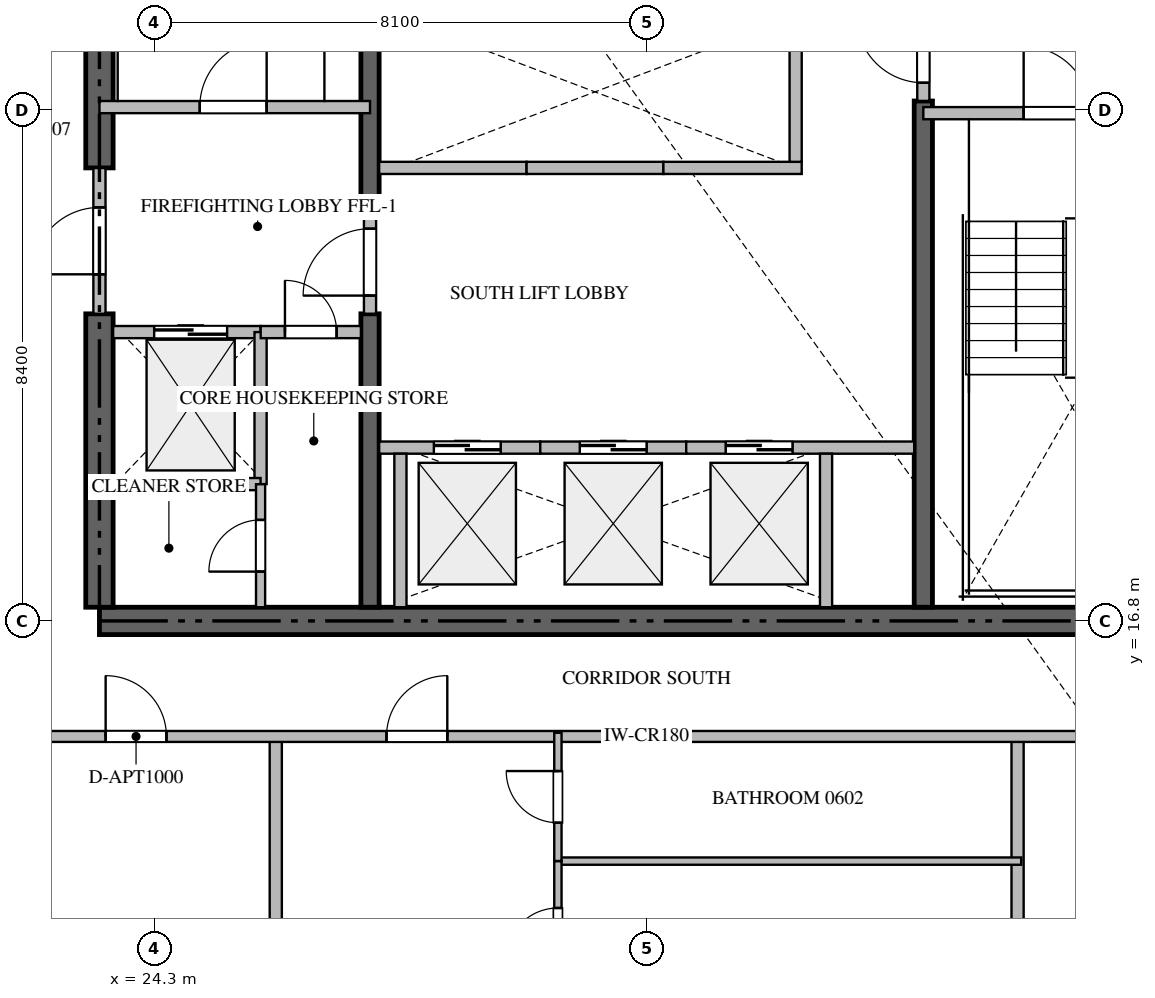
"""IFC4 building model, lengths in metres.
Left out: names, types, materials, properties, quantities, classifications, styles, units other than length and angle.
Written with IfcOpenShell. Run it as: python <this file> out.ifc"""

import sys

from ifc_helpers import new_model, si_unit, direction, frame, frame_2d, origin, place, context, subcontext, project, spatial, rectangle, extrude, source, transform, mapped, element, fill, save


model = new_model("IFC4")
c1 = context("Model", 3, precision=1e-05, world=origin(), true_north=direction((0.0, 1.0)))
c2 = subcontext(c1, "Body", "Model", "MODEL_VIEW")
j1 = project(units=[si_unit("LENGTHUNIT", "METRE"), si_unit("PLANEANGLEUNIT", "RADIAN")], contexts=[c1])
p1 = place(None, origin())
s1 = spatial("IfcSite", under=j1, at=p1, CompositionType="ELEMENT")
p2 = place(p1, origin())
s2 = spatial("IfcBuilding", under=s1, at=p2, CompositionType="ELEMENT")
p3 = place(p2, frame((0.0, 0.0, 30.45)))
s3 = spatial("IfcBuildingStorey", under=s2, at=p3, CompositionType="ELEMENT", Elevation=30.45)
p4 = place(p3, frame((23.4, 16.8, -0.26), z_axis=(0.0, 0.0, 1.0), x_axis=(1.0, 0.0, 0.0)))
e1 = element("IfcWall", 1, at=p4, inside=s3, PredefinedType="SHEAR", context=c2, shape_type="SweptSolid", body=[
    extrude(rectangle(XDim=18.0, YDim=0.45, at=frame_2d((9.0, 0.0))), origin(), (0.0, 0.0, 1.0), 3.748),
])
p5 = place(p3, frame((23.4, 17.025, -0.26), z_axis=(0.0, 0.0, 1.0), x_axis=(0.0, 1.0, 0.0)))
e2 = element("IfcWall", 2, at=p5, inside=s3, PredefinedType="SHEAR", context=c2, shape_type="SweptSolid", body=[
    extrude(rectangle(XDim=4.825, YDim=0.45, at=frame_2d((2.413, 0.0))), origin(), (0.0, 0.0, 1.0), 3.748),
])
p6 = place(p3, frame((23.4, 24.25, -0.26), z_axis=(0.0, 0.0, 1.0), x_axis=(0.0, 1.0, 0.0)))
e3 = element("IfcWall", 3, at=p6, inside=s3, PredefinedType="SHEAR", context=c2, shape_type="SweptSolid", body=[
    extrude(rectangle(XDim=9.125, YDim=0.45, at=frame_2d((4.562, 0.0))), origin(), (0.0, 0.0, 1.0), 3.748),
])
p7 = place(p3, frame((27.85, 17.025, -0.26), z_axis=(0.0, 0.0, 1.0), x_axis=(0.0, 1.0, 0.0)))
e4 = element("IfcWall", 4, at=p7, inside=s3, PredefinedType="SHEAR", context=c2, shape_type="SweptSolid", body=[
    extrude(rectangle(XDim=4.825, YDim=0.3, at=frame_2d((2.413, 0.0))), origin(), (0.0, 0.0, 1.0), 3.748),
])
p8 = place(p3, frame((27.85, 23.55, -0.26), z_axis=(0.0, 0.0, 1.0), x_axis=(0.0, 1.0, 0.0)))
e5 = element("IfcWall", 5, at=p8, inside=s3, PredefinedType="SHEAR", context=c2, shape_type="SweptSolid", body=[
    extrude(rectangle(XDim=9.825, YDim=0.3, at=frame_2d((4.913, 0.0))), origin(), (0.0, 0.0, 1.0), 3.748),
])
p9 = place(p3, frame((36.95, 17.025, -0.26), z_axis=(0.0, 0.0, 1.0), x_axis=(0.0, 1.0, 0.0)))
e6 = element("IfcWall", 6, at=p9, inside=s3, PredefinedType="SHEAR", context=c2, shape_type="SweptSolid", body=[
    extrude(rectangle(XDim=8.325, YDim=0.3, at=frame_2d((4.163, 0.0))), origin(), (0.0, 0.0, 1.0), 3.748),
])
p10 = place(p3, frame((23.4, 25.25, 0.0), z_axis=(0.0, 0.0, 1.0), x_axis=(1.0, 0.0, 0.0)))
e7 = element("IfcWall", 7, at=p10, inside=s3, PredefinedType="STANDARD", context=c2, shape_type="SweptSolid", body=[
    extrude(rectangle(XDim=4.45, YDim=0.2, at=frame_2d((2.225, 0.0))), origin(), (0.0, 0.0, 1.0), 3.49),
])
p11 = place(p10, frame((1.65, 0.0, 0.0)))
e8 = element("IfcOpeningElement", 8, at=p11, cuts=e7, PredefinedType="OPENING", context=c2, shape_type="SweptSolid", body=[
    extrude(rectangle(XDim=1.1, YDim=2.15, at=frame_2d((0.55, 1.075))), frame((0.0, 0.11, 0.0), z_axis=(0.0, -1.0, 0.0), x_axis=(1.0, 0.0, 0.0)), (0.0, 0.0, 1.0), 0.22),
])
p12 = place(p3, frame((36.95, 25.15, 0.0), z_axis=(0.0, 0.0, 1.0), x_axis=(1.0, 0.0, 0.0)))
e9 = element("IfcWall", 9, at=p12, inside=s3, PredefinedType="STANDARD", context=c2, shape_type="SweptSolid", body=[
    extrude(rectangle(XDim=4.45, YDim=0.2, at=frame_2d((2.225, 0.0))), origin(), (0.0, 0.0, 1.0), 3.49),
])
p13 = place(p12, frame((1.65, 0.0, 0.0)))
e10 = element("IfcOpeningElement", 10, at=p13, cuts=e9, PredefinedType="OPENING", context=c2, shape_type="SweptSolid", body=[
    extrude(rectangle(XDim=1.1, YDim=2.15, at=frame_2d((0.55, 1.075))), frame((0.0, 0.11, 0.0), z_axis=(0.0, -1.0, 0.0), x_axis=(1.0, 0.0, 0.0)), (0.0, 0.0, 1.0), 0.22),
])
p14 = place(p3, frame((23.625, 21.55, 0.0), z_axis=(0.0, 0.0, 1.0), x_axis=(1.0, 0.0, 0.0)))
e11 = element("IfcWall", 11, at=p14, inside=s3, PredefinedType="STANDARD", context=c2, shape_type="SweptSolid", body=[
    extrude(rectangle(XDim=2.425, YDim=0.2, at=frame_2d((1.212, 0.0))), origin(), (0.0, 0.0, 1.0), 3.49),
])
p15 = place(p14, frame((0.675, 0.0, 0.0)))
e12 = element("IfcOpeningElement", 12, at=p15, cuts=e11, PredefinedType="OPENING", context=c2, shape_type="SweptSolid", body=[
    extrude(rectangle(XDim=1.2, YDim=2.2, at=frame_2d((0.6, 1.1))), frame((0.0, 0.11, 0.0), z_axis=(0.0, -1.0, 0.0), x_axis=(1.0, 0.0, 0.0)), (0.0, 0.0, 1.0), 0.22),
])
p16 = place(p3, frame((28.0, 19.65, 0.0), z_axis=(0.0, 0.0, 1.0), x_axis=(1.0, 0.0, 0.0)))
e13 = element("IfcWall", 13, at=p16, inside=s3, PredefinedType="STANDARD", context=c2, shape_type="SweptSolid", body=[
    extrude(rectangle(XDim=2.65, YDim=0.2, at=frame_2d((1.325, 0.0))), origin(), (0.0, 0.0, 1.0), 3.49),
])
p17 = place(p16, frame((0.9, 0.0, 0.0)))
e14 = element("IfcOpeningElement", 14, at=p17, cuts=e13, PredefinedType="OPENING", context=c2, shape_type="SweptSolid", body=[
    extrude(rectangle(XDim=1.1, YDim=2.2, at=frame_2d((0.55, 1.1))), frame((0.0, 0.11, 0.0), z_axis=(0.0, -1.0, 0.0), x_axis=(1.0, 0.0, 0.0)), (0.0, 0.0, 1.0), 0.22),
])
p18 = place(p3, frame((28.35, 17.025, 0.0), z_axis=(0.0, 0.0, 1.0), x_axis=(0.0, 1.0, 0.0)))
e15 = element("IfcWall", 15, at=p18, inside=s3, PredefinedType="STANDARD", context=c2, shape_type="SweptSolid", body=[
    extrude(rectangle(XDim=2.525, YDim=0.2, at=frame_2d((1.263, 0.0))), origin(), (0.0, 0.0, 1.0), 3.49),
])
p19 = place(p3, frame((30.65, 19.65, 0.0), z_axis=(0.0, 0.0, 1.0), x_axis=(1.0, 0.0, 0.0)))
e16 = element("IfcWall", 16, at=p19, inside=s3, PredefinedType="STANDARD", context=c2, shape_type="SweptSolid", body=[
    extrude(rectangle(XDim=2.4, YDim=0.2, at=frame_2d((1.2, 0.0))), origin(), (0.0, 0.0, 1.0), 3.49),
])
p20 = place(p19, frame((0.65, 0.0, 0.0)))
e17 = element("IfcOpeningElement", 17, at=p20, cuts=e16, PredefinedType="OPENING", context=c2, shape_type="SweptSolid", body=[
    extrude(rectangle(XDim=1.1, YDim=2.2, at=frame_2d((0.55, 1.1))), frame((0.0, 0.11, 0.0), z_axis=(0.0, -1.0, 0.0), x_axis=(1.0, 0.0, 0.0)), (0.0, 0.0, 1.0), 0.22),
])
p21 = place(p3, frame((33.05, 19.65, 0.0), z_axis=(0.0, 0.0, 1.0), x_axis=(1.0, 0.0, 0.0)))
e18 = element("IfcWall", 18, at=p21, inside=s3, PredefinedType="STANDARD", context=c2, shape_type="SweptSolid", body=[
    extrude(rectangle(XDim=3.75, YDim=0.2, at=frame_2d((1.875, 0.0))), origin(), (0.0, 0.0, 1.0), 3.49),
])
p22 = place(p21, frame((0.65, 0.0, 0.0)))
e19 = element("IfcOpeningElement", 19, at=p22, cuts=e18, PredefinedType="OPENING", context=c2, shape_type="SweptSolid", body=[
    extrude(rectangle(XDim=1.1, YDim=2.2, at=frame_2d((0.55, 1.1))), frame((0.0, 0.11, 0.0), z_axis=(0.0, -1.0, 0.0), x_axis=(1.0, 0.0, 0.0)), (0.0, 0.0, 1.0), 0.22),
])
p23 = place(p3, frame((35.35, 17.025, 0.0), z_axis=(0.0, 0.0, 1.0), x_axis=(0.0, 1.0, 0.0)))
e20 = element("IfcWall", 20, at=p23, inside=s3, PredefinedType="STANDARD", context=c2, shape_type="SweptSolid", body=[
    extrude(rectangle(XDim=2.525, YDim=0.2, at=frame_2d((1.263, 0.0))), origin(), (0.0, 0.0, 1.0), 3.49),
])
p24 = place(p3, frame((28.0, 24.25, 0.0), z_axis=(0.0, 0.0, 1.0), x_axis=(1.0, 0.0, 0.0)))
e21 = element("IfcWall", 21, at=p24, inside=s3, PredefinedType="STANDARD", context=c2, shape_type="SweptSolid", body=[
    extrude(rectangle(XDim=2.425, YDim=0.2, at=frame_2d((1.212, 0.0))), origin(), (0.0, 0.0, 1.0), 3.49),
])
p25 = place(p3, frame((30.425, 24.25, 0.0), z_axis=(0.0, 0.0, 1.0), x_axis=(1.0, 0.0, 0.0)))
e22 = element("IfcWall", 22, at=p25, inside=s3, PredefinedType="STANDARD", context=c2, shape_type="SweptSolid", body=[
    extrude(rectangle(XDim=2.25, YDim=0.2, at=frame_2d((1.125, 0.0))), origin(), (0.0, 0.0, 1.0), 3.49),
])
p26 = place(p3, frame((32.675, 24.25, 0.0), z_axis=(0.0, 0.0, 1.0), x_axis=(1.0, 0.0, 0.0)))
e23 = element("IfcWall", 23, at=p26, inside=s3, PredefinedType="STANDARD", context=c2, shape_type="SweptSolid", body=[
    extrude(rectangle(XDim=2.275, YDim=0.2, at=frame_2d((1.137, 0.0))), origin(), (0.0, 0.0, 1.0), 3.49),
])
for number, where, z_axis, x_axis in (
    (24, (34.85, 24.35, 0.0), (0.0, 0.0, 1.0), (0.0, 1.0, 0.0)),
    (25, (26.05, 19.05, 0.0), (0.0, 0.0, 1.0), (0.0, 1.0, 0.0)),
):
    element("IfcWall", number, at=place(p3, frame(where, z_axis=z_axis, x_axis=x_axis)), inside=s3, PredefinedType="STANDARD", context=c2, shape_type="SweptSolid", body=[
        extrude(rectangle(XDim=2.5, YDim=0.2, at=frame_2d((1.25, 0.0))), origin(), (0.0, 0.0, 1.0), 3.49),
    ])
p27 = place(p3, frame((23.625, 19.05, 0.0), z_axis=(0.0, 0.0, 1.0), x_axis=(1.0, 0.0, 0.0)))
e26 = element("IfcWall", 26, at=p27, inside=s3, PredefinedType="STANDARD", context=c2, shape_type="SweptSolid", body=[
    extrude(rectangle(XDim=2.425, YDim=0.2, at=frame_2d((1.212, 0.0))), origin(), (0.0, 0.0, 1.0), 3.49),
])
p28 = place(p3, frame((26.052, 21.55, 0.0), z_axis=(0.0, 0.0, 1.0), x_axis=(1.0, 0.0, 0.0)))
e27 = element("IfcWall", 27, at=p28, inside=s3, PredefinedType="STANDARD", context=c2, shape_type="SweptSolid", body=[
    extrude(rectangle(XDim=1.648, YDim=0.2, at=frame_2d((0.824, 0.0))), origin(), (0.0, 0.0, 1.0), 3.49),
])
p29 = place(p28, frame((0.399, 0.0, 0.0)))
e28 = element("IfcOpeningElement", 28, at=p29, cuts=e27, PredefinedType="OPENING", context=c2, shape_type="SweptSolid", body=[
    extrude(rectangle(XDim=0.85, YDim=2.1, at=frame_2d((0.425, 1.05))), frame((0.0, 0.11, 0.0), z_axis=(0.0, -1.0, 0.0), x_axis=(1.0, 0.0, 0.0)), (0.0, 0.0, 1.0), 0.22),
])
p30 = place(p3, frame((23.4, 21.852, 0.0), z_axis=(0.0, 0.0, 1.0), x_axis=(0.0, 1.0, 0.0)))
e29 = element("IfcWall", 29, at=p30, inside=s3, PredefinedType="STANDARD", context=c2, shape_type="SweptSolid", body=[
    extrude(rectangle(XDim=2.396, YDim=0.2, at=frame_2d((1.198, 0.0))), origin(), (0.0, 0.0, 1.0), 3.49),
])
p31 = place(p30, frame((0.648, 0.0, 0.0)))
e30 = element("IfcOpeningElement", 30, at=p31, cuts=e29, PredefinedType="OPENING", context=c2, shape_type="SweptSolid", body=[
    extrude(rectangle(XDim=1.1, YDim=2.15, at=frame_2d((0.55, 1.075))), frame((0.0, 0.11, 0.0), z_axis=(0.0, -1.0, 0.0), x_axis=(1.0, 0.0, 0.0)), (0.0, 0.0, 1.0), 0.22),
])
p32 = place(p3, frame((27.85, 21.852, 0.0), z_axis=(0.0, 0.0, 1.0), x_axis=(0.0, 1.0, 0.0)))
e31 = element("IfcWall", 31, at=p32, inside=s3, PredefinedType="STANDARD", context=c2, shape_type="SweptSolid", body=[
    extrude(rectangle(XDim=1.696, YDim=0.2, at=frame_2d((0.848, 0.0))), origin(), (0.0, 0.0, 1.0), 3.49),
])
p33 = place(p32, frame((0.298, 0.0, 0.0)))
e32 = element("IfcOpeningElement", 32, at=p33, cuts=e31, PredefinedType="OPENING", context=c2, shape_type="SweptSolid", body=[
    extrude(rectangle(XDim=1.1, YDim=2.15, at=frame_2d((0.55, 1.075))), frame((0.0, 0.11, 0.0), z_axis=(0.0, -1.0, 0.0), x_axis=(1.0, 0.0, 0.0)), (0.0, 0.0, 1.0), 0.22),
])
p34 = place(p3, frame((36.95, 25.352, 0.0), z_axis=(0.0, 0.0, 1.0), x_axis=(0.0, 1.0, 0.0)))
e33 = element("IfcWall", 33, at=p34, inside=s3, PredefinedType="STANDARD", context=c2, shape_type="SweptSolid", body=[
    extrude(rectangle(XDim=1.696, YDim=0.2, at=frame_2d((0.848, 0.0))), origin(), (0.0, 0.0, 1.0), 3.49),
])
p35 = place(p34, frame((0.298, 0.0, 0.0)))
e34 = element("IfcOpeningElement", 34, at=p35, cuts=e33, PredefinedType="OPENING", context=c2, shape_type="SweptSolid", body=[
    extrude(rectangle(XDim=1.1, YDim=2.15, at=frame_2d((0.55, 1.075))), frame((0.0, 0.11, 0.0), z_axis=(0.0, -1.0, 0.0), x_axis=(1.0, 0.0, 0.0)), (0.0, 0.0, 1.0), 0.22),
])
p36 = place(p3, frame((26.05, 17.025, 0.0), z_axis=(0.0, 0.0, 1.0), x_axis=(0.0, 1.0, 0.0)))
e35 = element("IfcWall", 35, at=p36, inside=s3, PredefinedType="PARTITIONING", context=c2, shape_type="SweptSolid", body=[
    extrude(rectangle(XDim=2.023, YDim=0.15, at=frame_2d((1.012, 0.0))), origin(), (0.0, 0.0, 1.0), 3.49),
])
p37 = place(p36, frame((0.586, 0.0, 0.0)))
e36 = element("IfcOpeningElement", 36, at=p37, cuts=e35, PredefinedType="OPENING", context=c2, shape_type="SweptSolid", body=[
    extrude(rectangle(XDim=0.85, YDim=2.1, at=frame_2d((0.425, 1.05))), frame((0.0, 0.085, 0.0), z_axis=(0.0, -1.0, 0.0), x_axis=(1.0, 0.0, 0.0)), (0.0, 0.0, 1.0), 0.17),
])
for number, where, z_axis, x_axis in (
    (37, (26.3, 0.282, 0.0), (0.0, 0.0, 1.0), (0.0, 1.0, 0.0)),
    (38, (38.5, 0.282, 0.0), (0.0, 0.0, 1.0), (0.0, 1.0, 0.0)),
):
    element("IfcWall", number, at=place(p3, frame(where, z_axis=z_axis, x_axis=x_axis)), inside=s3, PredefinedType="PARTITIONING", context=c2, shape_type="SweptSolid", body=[
        extrude(rectangle(XDim=14.618, YDim=0.2, at=frame_2d((7.309, 0.0))), origin(), (0.0, 0.0, 1.0), 3.49),
    ])
p38 = place(p3, frame((21.402, 14.9, 0.0), z_axis=(0.0, 0.0, 1.0), x_axis=(1.0, 0.0, 0.0)))
e39 = element("IfcWall", 39, at=p38, inside=s3, PredefinedType="PARTITIONING", context=c2, shape_type="SweptSolid", body=[
    extrude(rectangle(XDim=21.996, YDim=0.18, at=frame_2d((10.998, 0.0))), origin(), (0.0, 0.0, 1.0), 3.49),
])
p39 = place(p38, frame((2.1, 0.0, 0.0)))
e40 = element("IfcOpeningElement", 40, at=p39, cuts=e39, PredefinedType="OPENING", context=c2, shape_type="SweptSolid", body=[
    extrude(rectangle(XDim=1.0, YDim=2.15, at=frame_2d((0.5, 1.075))), frame((0.0, 0.1, 0.0), z_axis=(0.0, -1.0, 0.0), x_axis=(1.0, 0.0, 0.0)), (0.0, 0.0, 1.0), 0.2),
])
p40 = place(p38, frame((6.719, 0.0, 0.0)))
e41 = element("IfcOpeningElement", 41, at=p40, cuts=e39, PredefinedType="OPENING", context=c2, shape_type="SweptSolid", body=[
    extrude(rectangle(XDim=1.0, YDim=2.15, at=frame_2d((0.5, 1.075))), frame((0.0, 0.1, 0.0), z_axis=(0.0, -1.0, 0.0), x_axis=(1.0, 0.0, 0.0)), (0.0, 0.0, 1.0), 0.2),
])
p41 = place(p38, frame((18.896, 0.0, 0.0)))
e42 = element("IfcOpeningElement", 42, at=p41, cuts=e39, PredefinedType="OPENING", context=c2, shape_type="SweptSolid", body=[
    extrude(rectangle(XDim=1.0, YDim=2.15, at=frame_2d((0.5, 1.075))), frame((0.0, 0.1, 0.0), z_axis=(0.0, -1.0, 0.0), x_axis=(1.0, 0.0, 0.0)), (0.0, 0.0, 1.0), 0.2),
])
p42 = place(p3, frame((30.94, 12.85, 0.0), z_axis=(0.0, 0.0, 1.0), x_axis=(1.0, 0.0, 0.0)))
e43 = element("IfcWall", 43, at=p42, inside=s3, PredefinedType="PARTITIONING", context=c2, shape_type="SweptSolid", body=[
    extrude(rectangle(XDim=7.62, YDim=0.12, at=frame_2d((3.81, 0.0))), origin(), (0.0, 0.0, 1.0), 3.49),
])
p43 = place(p3, frame((30.94, 10.458, 0.0), z_axis=(0.0, 0.0, 1.0), x_axis=(0.0, 1.0, 0.0)))
e44 = element("IfcWall", 44, at=p43, inside=s3, PredefinedType="PARTITIONING", context=c2, shape_type="SweptSolid", body=[
    extrude(rectangle(XDim=2.392, YDim=0.12, at=frame_2d((1.196, 0.0))), origin(), (0.0, 0.0, 1.0), 3.49),
])
p44 = place(p43, frame((0.771, 0.0, 0.0)))
e45 = element("IfcOpeningElement", 45, at=p44, cuts=e44, PredefinedType="OPENING", context=c2, shape_type="SweptSolid", body=[
    extrude(rectangle(XDim=0.85, YDim=2.1, at=frame_2d((0.425, 1.05))), frame((0.0, 0.07, 0.0), z_axis=(0.0, -1.0, 0.0), x_axis=(1.0, 0.0, 0.0)), (0.0, 0.0, 1.0), 0.14),
])
p45 = place(p3, frame((30.94, 12.852, 0.0), z_axis=(0.0, 0.0, 1.0), x_axis=(0.0, 1.0, 0.0)))
e46 = element("IfcWall", 46, at=p45, inside=s3, PredefinedType="PARTITIONING", context=c2, shape_type="SweptSolid", body=[
    extrude(rectangle(XDim=2.108, YDim=0.12, at=frame_2d((1.054, 0.0))), origin(), (0.0, 0.0, 1.0), 3.49),
])
p46 = place(p45, frame((0.629, 0.0, 0.0)))
e47 = element("IfcOpeningElement", 47, at=p46, cuts=e46, PredefinedType="OPENING", context=c2, shape_type="SweptSolid", body=[
    extrude(rectangle(XDim=0.85, YDim=2.1, at=frame_2d((0.425, 1.05))), frame((0.0, 0.07, 0.0), z_axis=(0.0, -1.0, 0.0), x_axis=(1.0, 0.0, 0.0)), (0.0, 0.0, 1.0), 0.14),
])
m1 = source(origin(), c2, "Body", "SweptSolid", [
    extrude(rectangle(XDim=1.1, YDim=2.15, at=frame_2d((0.55, 1.075))), frame((0.0, 0.025, 0.0), z_axis=(0.0, -1.0, 0.0), x_axis=(1.0, 0.0, 0.0)), (0.0, 0.0, 1.0), 0.05),
])
p47 = place(p11, origin())
e48 = element("IfcDoor", 48, at=p47, inside=s3, OperationType="SINGLE_SWING_RIGHT", PredefinedType="DOOR", context=c2, shape_type="MappedRepresentation", body=[
    mapped(m1, transform((0.0, 0.0, 0.0), scale=1.0)),
])
fill(e8, e48)
p48 = place(p13, origin())
e49 = element("IfcDoor", 49, at=p48, inside=s3, OperationType="SINGLE_SWING_LEFT", PredefinedType="DOOR", context=c2, shape_type="MappedRepresentation", body=[
    mapped(m1, transform((0.0, 0.0, 0.0), scale=1.0)),
])
fill(e10, e49)
m2 = source(origin(), c2, "Body", "SweptSolid", [
    extrude(rectangle(XDim=1.2, YDim=2.2, at=frame_2d((0.6, 1.1))), frame((0.0, 0.025, 0.0), z_axis=(0.0, -1.0, 0.0), x_axis=(1.0, 0.0, 0.0)), (0.0, 0.0, 1.0), 0.05),
])
p49 = place(p15, origin())
e50 = element("IfcDoor", 50, at=p49, inside=s3, OperationType="DOUBLE_DOOR_SLIDING", PredefinedType="DOOR", context=c2, shape_type="MappedRepresentation", body=[
    mapped(m2, transform((0.0, 0.0, 0.0), scale=1.0)),
])
fill(e12, e50)
m3 = source(origin(), c2, "Body", "SweptSolid", [
    extrude(rectangle(XDim=1.1, YDim=2.2, at=frame_2d((0.55, 1.1))), frame((0.0, 0.025, 0.0), z_axis=(0.0, -1.0, 0.0), x_axis=(1.0, 0.0, 0.0)), (0.0, 0.0, 1.0), 0.05),
])
p50 = place(p17, origin())
e51 = element("IfcDoor", 51, at=p50, inside=s3, OperationType="DOUBLE_DOOR_SLIDING", PredefinedType="DOOR", context=c2, shape_type="MappedRepresentation", body=[
    mapped(m3, transform((0.0, 0.0, 0.0), scale=1.0)),
])
fill(e14, e51)
p51 = place(p20, origin())
e52 = element("IfcDoor", 52, at=p51, inside=s3, OperationType="DOUBLE_DOOR_SLIDING", PredefinedType="DOOR", context=c2, shape_type="MappedRepresentation", body=[
    mapped(m3, transform((0.0, 0.0, 0.0), scale=1.0)),
])
fill(e17, e52)
p52 = place(p22, origin())
e53 = element("IfcDoor", 53, at=p52, inside=s3, OperationType="DOUBLE_DOOR_SLIDING", PredefinedType="DOOR", context=c2, shape_type="MappedRepresentation", body=[
    mapped(m3, transform((0.0, 0.0, 0.0), scale=1.0)),
])
fill(e19, e53)
m4 = source(origin(), c2, "Body", "SweptSolid", [
    extrude(rectangle(XDim=0.85, YDim=2.1, at=frame_2d((0.425, 1.05))), frame((0.0, 0.025, 0.0), z_axis=(0.0, -1.0, 0.0), x_axis=(1.0, 0.0, 0.0)), (0.0, 0.0, 1.0), 0.05),
])
p53 = place(p29, origin())
e54 = element("IfcDoor", 54, at=p53, inside=s3, OperationType="SINGLE_SWING_LEFT", PredefinedType="DOOR", context=c2, shape_type="MappedRepresentation", body=[
    mapped(m4, transform((0.0, 0.0, 0.0), scale=1.0)),
])
fill(e28, e54)
p54 = place(p31, origin())
e55 = element("IfcDoor", 55, at=p54, inside=s3, OperationType="SINGLE_SWING_LEFT", PredefinedType="DOOR", context=c2, shape_type="MappedRepresentation", body=[
    mapped(m1, transform((0.0, 0.0, 0.0), scale=1.0)),
])
fill(e30, e55)
p55 = place(p33, origin())
e56 = element("IfcDoor", 56, at=p55, inside=s3, OperationType="SINGLE_SWING_LEFT", PredefinedType="DOOR", context=c2, shape_type="MappedRepresentation", body=[
    mapped(m1, transform((0.0, 0.0, 0.0), scale=1.0)),
])
fill(e32, e56)
p56 = place(p35, origin())
e57 = element("IfcDoor", 57, at=p56, inside=s3, OperationType="SINGLE_SWING_RIGHT", PredefinedType="DOOR", context=c2, shape_type="MappedRepresentation", body=[
    mapped(m1, transform((0.0, 0.0, 0.0), scale=1.0)),
])
fill(e34, e57)
p57 = place(p37, origin())
e58 = element("IfcDoor", 58, at=p57, inside=s3, OperationType="SINGLE_SWING_LEFT", PredefinedType="DOOR", context=c2, shape_type="MappedRepresentation", body=[
    mapped(m4, transform((0.0, 0.0, 0.0), scale=1.0)),
])
fill(e36, e58)
m5 = source(origin(), c2, "Body", "SweptSolid", [
    extrude(rectangle(XDim=1.0, YDim=2.15, at=frame_2d((0.5, 1.075))), frame((0.0, 0.025, 0.0), z_axis=(0.0, -1.0, 0.0), x_axis=(1.0, 0.0, 0.0)), (0.0, 0.0, 1.0), 0.05),
])
p58 = place(p39, origin())
e59 = element("IfcDoor", 59, at=p58, inside=s3, OperationType="SINGLE_SWING_LEFT", PredefinedType="DOOR", context=c2, shape_type="MappedRepresentation", body=[
    mapped(m5, transform((0.0, 0.0, 0.0), scale=1.0)),
])
fill(e40, e59)
p59 = place(p40, origin())
e60 = element("IfcDoor", 60, at=p59, inside=s3, OperationType="SINGLE_SWING_RIGHT", PredefinedType="DOOR", context=c2, shape_type="MappedRepresentation", body=[
    mapped(m5, transform((0.0, 0.0, 0.0), scale=1.0)),
])
fill(e41, e60)
p60 = place(p44, origin())
e61 = element("IfcDoor", 61, at=p60, inside=s3, OperationType="SINGLE_SWING_LEFT", PredefinedType="DOOR", context=c2, shape_type="MappedRepresentation", body=[
    mapped(m4, transform((0.0, 0.0, 0.0), scale=1.0)),
])
fill(e45, e61)
p61 = place(p46, origin())
e62 = element("IfcDoor", 62, at=p61, inside=s3, OperationType="SINGLE_SWING_RIGHT", PredefinedType="DOOR", context=c2, shape_type="MappedRepresentation", body=[
    mapped(m4, transform((0.0, 0.0, 0.0), scale=1.0)),
])
fill(e47, e62)
save(model, sys.argv[1])
